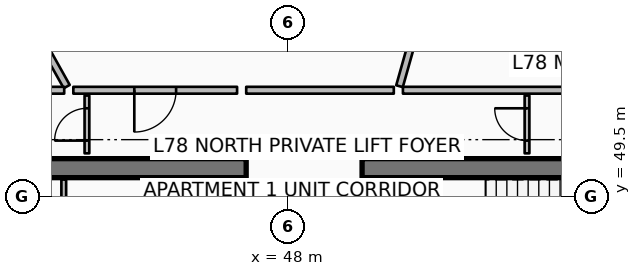
"""IFC4 building model, lengths in metres.
Left out: names, types, materials, properties, quantities, classifications, styles, units other than length and angle.
Written with IfcOpenShell. Run it as: python <this file> out.ifc"""

import sys

from ifc_helpers import new_model, si_unit, direction, frame, frame_2d, origin, place, context, subcontext, project, spatial, rectangle, extrude, element, fill, save


model = new_model("IFC4")
c1 = context("Model", 3, precision=1e-05, world=origin(), true_north=direction((0.0, 1.0)))
c2 = subcontext(c1, "Body", "Model", "MODEL_VIEW")
j1 = project(units=[si_unit("LENGTHUNIT", "METRE"), si_unit("PLANEANGLEUNIT", "RADIAN")], contexts=[c1])
p1 = place(None, origin())
s1 = spatial("IfcSite", under=j1, at=p1, CompositionType="ELEMENT")
p2 = place(p1, origin())
s2 = spatial("IfcBuilding", under=s1, at=p2, CompositionType="ELEMENT")
p3 = place(p2, frame((0.0, 0.0, 309.85)))
s3 = spatial("IfcBuildingStorey", under=s2, at=p3, CompositionType="ELEMENT", Elevation=309.85)
p4 = place(p3, frame((37.3, 50.25, 0.0), z_axis=(0.0, 0.0, 1.0), x_axis=(1.0, 0.0, 0.0)))
e1 = element("IfcWall", 1, at=p4, inside=s3, PredefinedType="SHEAR", context=c2, shape_type="SweptSolid", body=[
    extrude(rectangle(XDim=9.6, YDim=0.5, at=frame_2d((4.8, 0.0))), origin(), (0.0, 0.0, 1.0), 3.85),
])
p5 = place(p3, frame((49.95, 50.25, 0.0), z_axis=(0.0, 0.0, 1.0), x_axis=(1.0, 0.0, 0.0)))
e2 = element("IfcWall", 2, at=p5, inside=s3, PredefinedType="SHEAR", context=c2, shape_type="SweptSolid", body=[
    extrude(rectangle(XDim=9.6, YDim=0.5, at=frame_2d((4.8, 0.0))), origin(), (0.0, 0.0, 1.0), 3.85),
])
p6 = place(p3, frame((51.31, 46.5, 0.0), z_axis=(0.0, 0.0, 1.0), x_axis=(0.0, 1.0, 0.0)))
e3 = element("IfcWall", 3, at=p6, inside=s3, PredefinedType="SHEAR", context=c2, shape_type="SweptSolid", body=[
    extrude(rectangle(XDim=3.5, YDim=0.28, at=frame_2d((1.75, 0.0))), origin(), (0.0, 0.0, 1.0), 3.85),
])
for number, where, z_axis, x_axis in (
    (4, (46.82, 47.92, 0.0), (0.0, 0.0, 1.0), (0.0, 1.0, 0.0)),
    (5, (42.1, 47.92, 0.0), (0.0, 0.0, 1.0), (0.0, 1.0, 0.0)),
):
    element("IfcWall", number, at=place(p3, frame(where, z_axis=z_axis, x_axis=x_axis)), inside=s3, PredefinedType="PARTITIONING", context=c2, shape_type="SweptSolid", body=[
        extrude(rectangle(XDim=2.03, YDim=0.125, at=frame_2d((1.015, 0.0))), origin(), (0.0, 0.0, 1.0), 2.89),
    ])
p7 = place(p3, frame((42.71, 50.64, 0.0), z_axis=(0.0, 0.0, 1.0), x_axis=(0.0, 1.0, 0.0)))
e6 = element("IfcWall", 6, at=p7, inside=s3, PredefinedType="PARTITIONING", context=c2, shape_type="SweptSolid", body=[
    extrude(rectangle(XDim=1.52, YDim=0.125, at=frame_2d((0.76, 0.0))), origin(), (0.0, 0.0, 1.0), 2.407),
])
p8 = place(p7, frame((0.335, 0.0, 0.0)))
e7 = element("IfcOpeningElement", 7, at=p8, cuts=e6, PredefinedType="OPENING", context=c2, shape_type="SweptSolid", body=[
    extrude(rectangle(XDim=0.85, YDim=2.06, at=frame_2d((0.425, 1.03))), frame((0.0, 0.073, 0.0), z_axis=(0.0, -1.0, 0.0), x_axis=(1.0, 0.0, 0.0)), (0.0, 0.0, 1.0), 0.145),
])
p9 = place(p3, frame((54.29, 50.64, 0.0), z_axis=(0.0, 0.0, 1.0), x_axis=(0.0, 1.0, 0.0)))
e8 = element("IfcWall", 8, at=p9, inside=s3, PredefinedType="PARTITIONING", context=c2, shape_type="SweptSolid", body=[
    extrude(rectangle(XDim=1.52, YDim=0.125, at=frame_2d((0.76, 0.0))), origin(), (0.0, 0.0, 1.0), 2.89),
])
p10 = place(p9, frame((0.335, 0.0, 0.0)))
e9 = element("IfcOpeningElement", 9, at=p10, cuts=e8, PredefinedType="OPENING", context=c2, shape_type="SweptSolid", body=[
    extrude(rectangle(XDim=0.85, YDim=2.06, at=frame_2d((0.425, 1.03))), frame((0.0, 0.073, 0.0), z_axis=(0.0, -1.0, 0.0), x_axis=(1.0, 0.0, 0.0)), (0.0, 0.0, 1.0), 0.145),
])
p11 = place(p3, frame((50.935, 52.406, 0.0), z_axis=(0.0, 0.0, 1.0), x_axis=(0.271447701057, 0.962453191376, 0.0)))
e10 = element("IfcWall", 10, at=p11, inside=s3, PredefinedType="PARTITIONING", context=c2, shape_type="SweptSolid", body=[
    extrude(rectangle(XDim=13.492, YDim=0.18, at=frame_2d((6.746, 0.0))), origin(), (0.0, 0.0, 1.0), 2.407),
])
p12 = place(p3, frame((42.178, 52.396, 0.0), z_axis=(0.0, 0.0, 1.0), x_axis=(-0.48861353883, 0.872500320729, 0.0)))
e11 = element("IfcWall", 11, at=p12, inside=s3, PredefinedType="PARTITIONING", context=c2, shape_type="SweptSolid", body=[
    extrude(rectangle(XDim=10.234, YDim=0.18, at=frame_2d((5.117, 0.0))), origin(), (0.0, 0.0, 1.0), 2.407),
])
p13 = place(p3, frame((46.661, 52.3, 0.0), z_axis=(0.0, 0.0, 1.0), x_axis=(-1.0, 0.0, 0.0)))
e12 = element("IfcWall", 12, at=p13, inside=s3, PredefinedType="PARTITIONING", context=c2, shape_type="SweptSolid", body=[
    extrude(rectangle(XDim=4.309, YDim=0.18, at=frame_2d((2.155, 0.0))), origin(), (0.0, 0.0, 1.0), 2.407),
])
p14 = place(p13, frame((1.604, 0.0, 0.0)))
e13 = element("IfcOpeningElement", 13, at=p14, cuts=e12, PredefinedType="OPENING", context=c2, shape_type="SweptSolid", body=[
    extrude(rectangle(XDim=1.1, YDim=2.1, at=frame_2d((0.55, 1.05))), frame((0.0, 0.1, 0.0), z_axis=(0.0, -1.0, 0.0), x_axis=(1.0, 0.0, 0.0)), (0.0, 0.0, 1.0), 0.2),
])
p15 = place(p3, frame((50.785, 52.3, 0.0), z_axis=(0.0, 0.0, 1.0), x_axis=(-1.0, 0.0, 0.0)))
e14 = element("IfcWall", 14, at=p15, inside=s3, PredefinedType="PARTITIONING", context=c2, shape_type="SweptSolid", body=[
    extrude(rectangle(XDim=3.884, YDim=0.18, at=frame_2d((1.942, 0.0))), origin(), (0.0, 0.0, 1.0), 2.407),
])
p16 = place(p3, frame((42.112, 52.3, 0.0), z_axis=(0.0, 0.0, 1.0), x_axis=(-1.0, 0.0, 0.0)))
e15 = element("IfcWall", 15, at=p16, inside=s3, PredefinedType="PARTITIONING", context=c2, shape_type="SweptSolid", body=[
    extrude(rectangle(XDim=4.692, YDim=0.18, at=frame_2d((2.346, 0.0))), origin(), (0.0, 0.0, 1.0), 2.407),
])
p17 = place(p3, frame((56.0, 52.3, 0.0), z_axis=(0.0, 0.0, 1.0), x_axis=(-1.0, 0.0, 0.0)))
e16 = element("IfcWall", 16, at=p17, inside=s3, PredefinedType="PARTITIONING", context=c2, shape_type="SweptSolid", body=[
    extrude(rectangle(XDim=4.975, YDim=0.18, at=frame_2d((2.488, 0.0))), origin(), (0.0, 0.0, 1.0), 2.407),
])
p18 = place(p8, origin())
e17 = element("IfcDoor", 17, at=p18, inside=s3, OperationType="SINGLE_SWING_LEFT", PredefinedType="DOOR", context=c2, shape_type="SweptSolid", body=[
    extrude(rectangle(XDim=0.85, YDim=2.06, at=frame_2d((0.425, 1.03))), frame((0.0, 0.025, 0.0), z_axis=(0.0, -1.0, 0.0), x_axis=(1.0, 0.0, 0.0)), (0.0, 0.0, 1.0), 0.05),
])
fill(e7, e17)
p19 = place(p10, origin())
e18 = element("IfcDoor", 18, at=p19, inside=s3, OperationType="SINGLE_SWING_RIGHT", PredefinedType="DOOR", context=c2, shape_type="SweptSolid", body=[
    extrude(rectangle(XDim=0.85, YDim=2.06, at=frame_2d((0.425, 1.03))), frame((0.0, 0.025, 0.0), z_axis=(0.0, -1.0, 0.0), x_axis=(1.0, 0.0, 0.0)), (0.0, 0.0, 1.0), 0.05),
])
fill(e9, e18)
p20 = place(p14, origin())
e19 = element("IfcDoor", 19, at=p20, inside=s3, OperationType="SINGLE_SWING_RIGHT", PredefinedType="DOOR", context=c2, shape_type="SweptSolid", body=[
    extrude(rectangle(XDim=1.1, YDim=2.1, at=frame_2d((0.55, 1.05))), frame((0.0, 0.025, 0.0), z_axis=(0.0, -1.0, 0.0), x_axis=(1.0, 0.0, 0.0)), (0.0, 0.0, 1.0), 0.05),
])
fill(e13, e19)
save(model, sys.argv[1])
